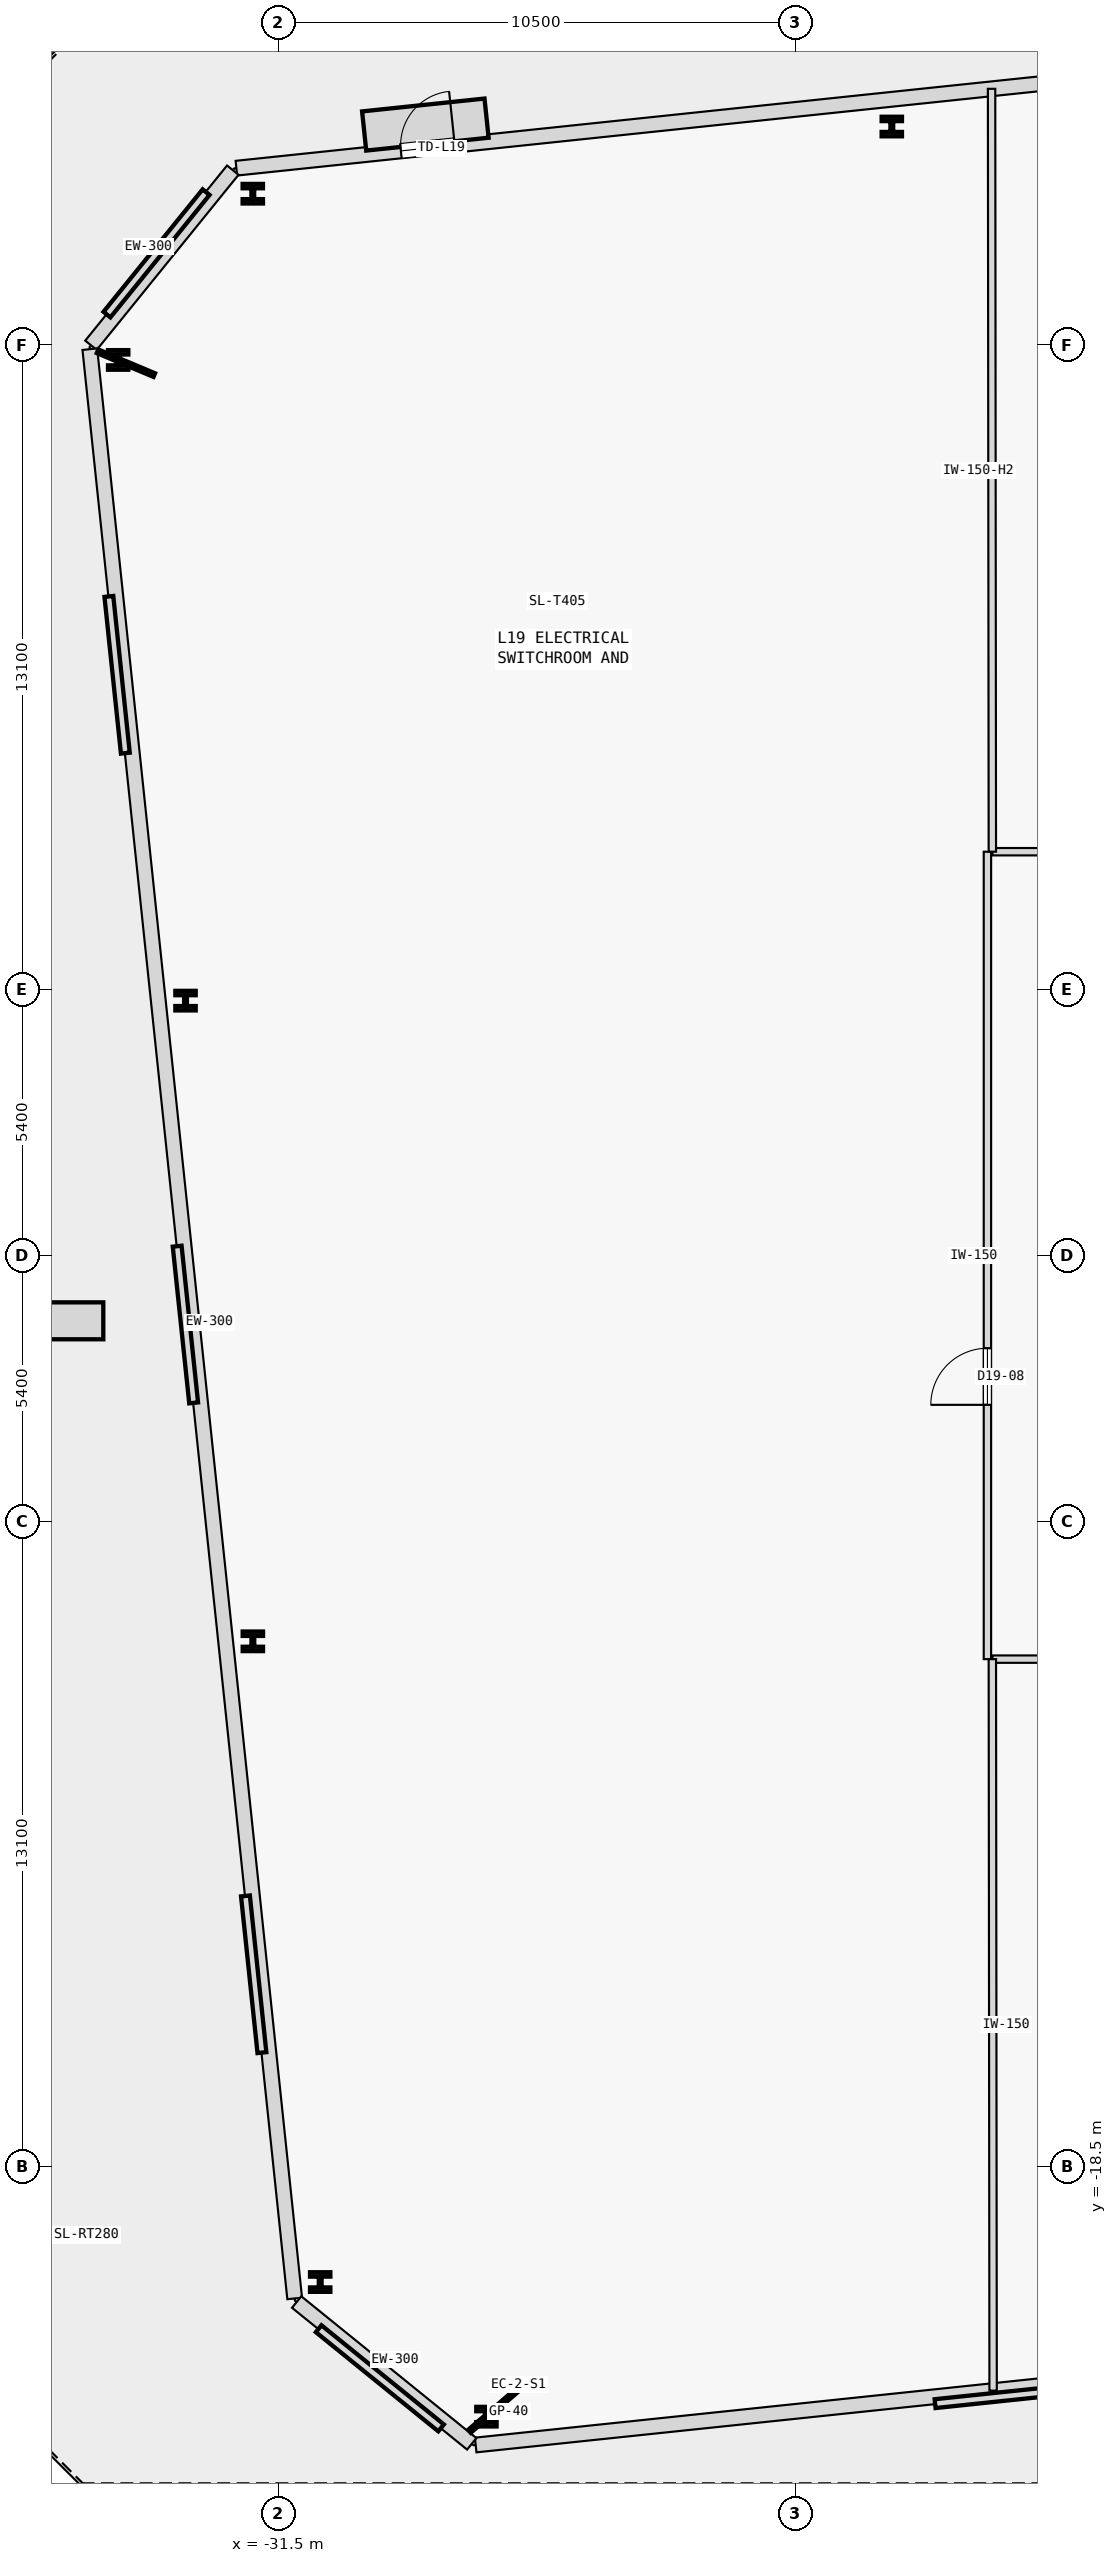
"""IFC4 building model, lengths in metres.
Left out: names, types, materials, properties, quantities, classifications, styles, units other than length and angle.
Written with IfcOpenShell. Run it as: python <this file> out.ifc"""

import sys

from ifc_helpers import new_model, si_unit, direction, frame, frame_2d, origin, origin_2d, place, context, subcontext, project, spatial, rectangle, i_section, extrude, element, fill, save


model = new_model("IFC4")
c1 = context("Model", 3, precision=1e-05, world=origin(), true_north=direction((0.0, 1.0)))
c2 = subcontext(c1, "Body", "Model", "MODEL_VIEW")
j1 = project(units=[si_unit("LENGTHUNIT", "METRE"), si_unit("PLANEANGLEUNIT", "RADIAN")], contexts=[c1])
p1 = place(None, origin())
s1 = spatial("IfcSite", under=j1, at=p1, CompositionType="ELEMENT")
p2 = place(p1, origin())
s2 = spatial("IfcBuilding", under=s1, at=p2, CompositionType="ELEMENT")
p3 = place(p2, frame((0.0, 0.0, 78.8)))
s3 = spatial("IfcBuildingStorey", under=s2, at=p3, CompositionType="ELEMENT", Elevation=78.8)
for number, where, z_axis, x_axis in (
    (1, (-27.276, -23.586, 0.0), (0.0, 0.0, 1.0), (1.0, 0.0, 0.0)),
    (2, (-19.042, 22.929, 0.0), (0.0, 0.0, 1.0), (1.0, 0.0, 0.0)),
    (3, (-32.022, 21.565, 0.0), (0.0, 0.0, 1.0), (1.0, 0.0, 0.0)),
    (4, (-34.756, 18.189, 0.0), (0.0, 0.0, 1.0), (1.0, 0.0, 0.0)),
    (5, (-33.388, 5.175, 0.0), (0.0, 0.0, 1.0), (1.0, 0.0, 0.0)),
    (6, (-32.021, -7.838, 0.0), (0.0, 0.0, 1.0), (1.0, 0.0, 0.0)),
    (7, (-30.653, -20.852, 0.0), (0.0, 0.0, 1.0), (1.0, 0.0, 0.0)),
):
    element("IfcColumn", number, at=place(p3, frame(where, z_axis=z_axis, x_axis=x_axis)), inside=s3, PredefinedType="COLUMN", context=c2, shape_type="SweptSolid", body=[
        extrude(i_section(OverallWidth=0.413, OverallDepth=0.398, WebThickness=0.056, FlangeThickness=0.089, FilletRadius=0.015, at=origin_2d()), origin(), (0.0, 0.0, 1.0), 4.4),
    ])
p4 = place(p3, frame((-27.494, -24.162, 0.0), z_axis=(0.0, 0.0, 1.0), x_axis=(0.99452206833, 0.104526817631, 0.0)))
e8 = element("IfcWall", 8, at=p4, inside=s3, PredefinedType="STANDARD", context=c2, shape_type="SweptSolid", body=[
    extrude(rectangle(XDim=65.81, YDim=0.3, at=frame_2d((32.905, 0.0))), origin(), (0.0, 0.0, 1.0), 4.15),
])
p5 = place(p3, frame((33.094, 28.962, 0.0), z_axis=(0.0, 0.0, 1.0), x_axis=(-0.994521682676, -0.104530486878, 0.0)))
e9 = element("IfcWall", 9, at=p5, inside=s3, PredefinedType="STANDARD", context=c2, shape_type="SweptSolid", body=[
    extrude(rectangle(XDim=65.81, YDim=0.3, at=frame_2d((32.905, 0.0))), origin(), (0.0, 0.0, 1.0), 4.15),
])
p6 = place(p5, frame((61.35, 0.0, 0.0)))
e10 = element("IfcOpeningElement", 10, at=p6, cuts=e9, PredefinedType="OPENING", context=c2, shape_type="SweptSolid", body=[
    extrude(rectangle(XDim=1.1, YDim=2.2, at=frame_2d((0.55, 1.1))), frame((0.0, 0.16, 0.0), z_axis=(0.0, -1.0, 0.0), x_axis=(1.0, 0.0, 0.0)), (0.0, 0.0, 1.0), 0.32),
])
p7 = place(p3, frame((-32.428, 22.043, 0.0), z_axis=(0.0, 0.0, 1.0), x_axis=(-0.629328651904, -0.777139271876, 0.0)))
e11 = element("IfcWall", 11, at=p7, inside=s3, PredefinedType="STANDARD", context=c2, shape_type="SweptSolid", body=[
    extrude(rectangle(XDim=4.577, YDim=0.3, at=frame_2d((2.289, 0.0))), origin(), (0.0, 0.0, 1.0), 4.15),
])
p8 = place(p3, frame((-35.332, 18.407, 0.0), z_axis=(0.0, 0.0, 1.0), x_axis=(0.104525165825, -0.994522241938, 0.0)))
e12 = element("IfcWall", 12, at=p8, inside=s3, PredefinedType="STANDARD", context=c2, shape_type="SweptSolid", body=[
    extrude(rectangle(XDim=39.81, YDim=0.3, at=frame_2d((19.905, 0.0))), origin(), (0.0, 0.0, 1.0), 4.15),
])
p9 = place(p3, frame((-31.131, -21.258, 0.0), z_axis=(0.0, 0.0, 1.0), x_axis=(0.777165360366, -0.629296434638, 0.0)))
e13 = element("IfcWall", 13, at=p9, inside=s3, PredefinedType="STANDARD", context=c2, shape_type="SweptSolid", body=[
    extrude(rectangle(XDim=4.577, YDim=0.3, at=frame_2d((2.288, 0.0))), origin(), (0.0, 0.0, 1.0), 4.15),
])
p10 = place(p3, frame((-17.0, 8.2, 0.0), z_axis=(0.0, 0.0, 1.0), x_axis=(1.0, 0.0, 0.0)))
e14 = element("IfcWall", 14, at=p10, inside=s3, PredefinedType="PARTITIONING", context=c2, shape_type="SweptSolid", body=[
    extrude(rectangle(XDim=17.4, YDim=0.15, at=frame_2d((8.7, 0.0))), origin(), (0.0, 0.0, 1.0), 4.15),
])
p11 = place(p10, frame((8.125, 0.0, 0.0)))
e15 = element("IfcOpeningElement", 15, at=p11, cuts=e14, PredefinedType="OPENING", context=c2, shape_type="SweptSolid", body=[
    extrude(rectangle(XDim=1.15, YDim=2.15, at=frame_2d((0.575, 1.075))), frame((0.0, 0.085, 0.0), z_axis=(0.0, -1.0, 0.0), x_axis=(1.0, 0.0, 0.0)), (0.0, 0.0, 1.0), 0.17),
])
p12 = place(p3, frame((-17.0, -8.2, 0.0), z_axis=(0.0, 0.0, 1.0), x_axis=(1.0, 0.0, 0.0)))
e16 = element("IfcWall", 16, at=p12, inside=s3, PredefinedType="PARTITIONING", context=c2, shape_type="SweptSolid", body=[
    extrude(rectangle(XDim=17.1, YDim=0.15, at=frame_2d((8.55, 0.0))), origin(), (0.0, 0.0, 1.0), 4.15),
])
p13 = place(p12, frame((7.975, 0.0, 0.0)))
e17 = element("IfcOpeningElement", 17, at=p13, cuts=e16, PredefinedType="OPENING", context=c2, shape_type="SweptSolid", body=[
    extrude(rectangle(XDim=1.15, YDim=2.15, at=frame_2d((0.575, 1.075))), frame((0.0, 0.085, 0.0), z_axis=(0.0, -1.0, 0.0), x_axis=(1.0, 0.0, 0.0)), (0.0, 0.0, 1.0), 0.17),
])
p14 = place(p3, frame((-17.1, -8.2, 0.0), z_axis=(0.0, 0.0, 1.0), x_axis=(0.0, 1.0, 0.0)))
e18 = element("IfcWall", 18, at=p14, inside=s3, PredefinedType="PARTITIONING", context=c2, shape_type="SweptSolid", body=[
    extrude(rectangle(XDim=16.4, YDim=0.15, at=frame_2d((8.2, 0.0))), origin(), (0.0, 0.0, 1.0), 4.15),
])
p15 = place(p14, frame((5.165, 0.0, 0.0)))
e19 = element("IfcOpeningElement", 19, at=p15, cuts=e18, PredefinedType="OPENING", context=c2, shape_type="SweptSolid", body=[
    extrude(rectangle(XDim=1.15, YDim=2.15, at=frame_2d((0.575, 1.075))), frame((0.0, 0.085, 0.0), z_axis=(0.0, -1.0, 0.0), x_axis=(1.0, 0.0, 0.0)), (0.0, 0.0, 1.0), 0.17),
])
p16 = place(p3, frame((-17.0, 8.2, 0.0), z_axis=(0.0, 0.0, 1.0), x_axis=(-0.001008365776, 0.999999491599, 0.0)))
e20 = element("IfcWall", 20, at=p16, inside=s3, PredefinedType="PARTITIONING", context=c2, shape_type="SweptSolid", body=[
    extrude(rectangle(XDim=15.495, YDim=0.15, at=frame_2d((7.748, 0.0))), origin(), (0.0, 0.0, 1.0), 3.55),
])
p17 = place(p3, frame((-16.984, -23.058, 0.0), z_axis=(0.0, 0.0, 1.0), x_axis=(-0.00105164508, 0.999999447021, 0.0)))
e21 = element("IfcWall", 21, at=p17, inside=s3, PredefinedType="PARTITIONING", context=c2, shape_type="SweptSolid", body=[
    extrude(rectangle(XDim=14.858, YDim=0.15, at=frame_2d((7.429, 0.0))), origin(), (0.0, 0.0, 1.0), 4.15),
])
p18 = place(p6, frame((1.1, 0.0, 0.0), z_axis=(0.0, 0.0, 1.0), x_axis=(-1.0, 0.0, 0.0)))
e22 = element("IfcDoor", 22, at=p18, inside=s3, OperationType="SINGLE_SWING_LEFT", PredefinedType="DOOR", context=c2, shape_type="SweptSolid", body=[
    extrude(rectangle(XDim=1.1, YDim=2.2, at=frame_2d((0.55, 1.1))), frame((0.0, 0.025, 0.0), z_axis=(0.0, -1.0, 0.0), x_axis=(1.0, 0.0, 0.0)), (0.0, 0.0, 1.0), 0.05),
])
fill(e10, e22)
p19 = place(p15, origin())
e23 = element("IfcDoor", 23, at=p19, inside=s3, OperationType="SINGLE_SWING_LEFT", PredefinedType="DOOR", context=c2, shape_type="SweptSolid", body=[
    extrude(rectangle(XDim=1.15, YDim=2.15, at=frame_2d((0.575, 1.075))), frame((0.0, 0.025, 0.0), z_axis=(0.0, -1.0, 0.0), x_axis=(1.0, 0.0, 0.0)), (0.0, 0.0, 1.0), 0.05),
])
fill(e19, e23)
save(model, sys.argv[1])
